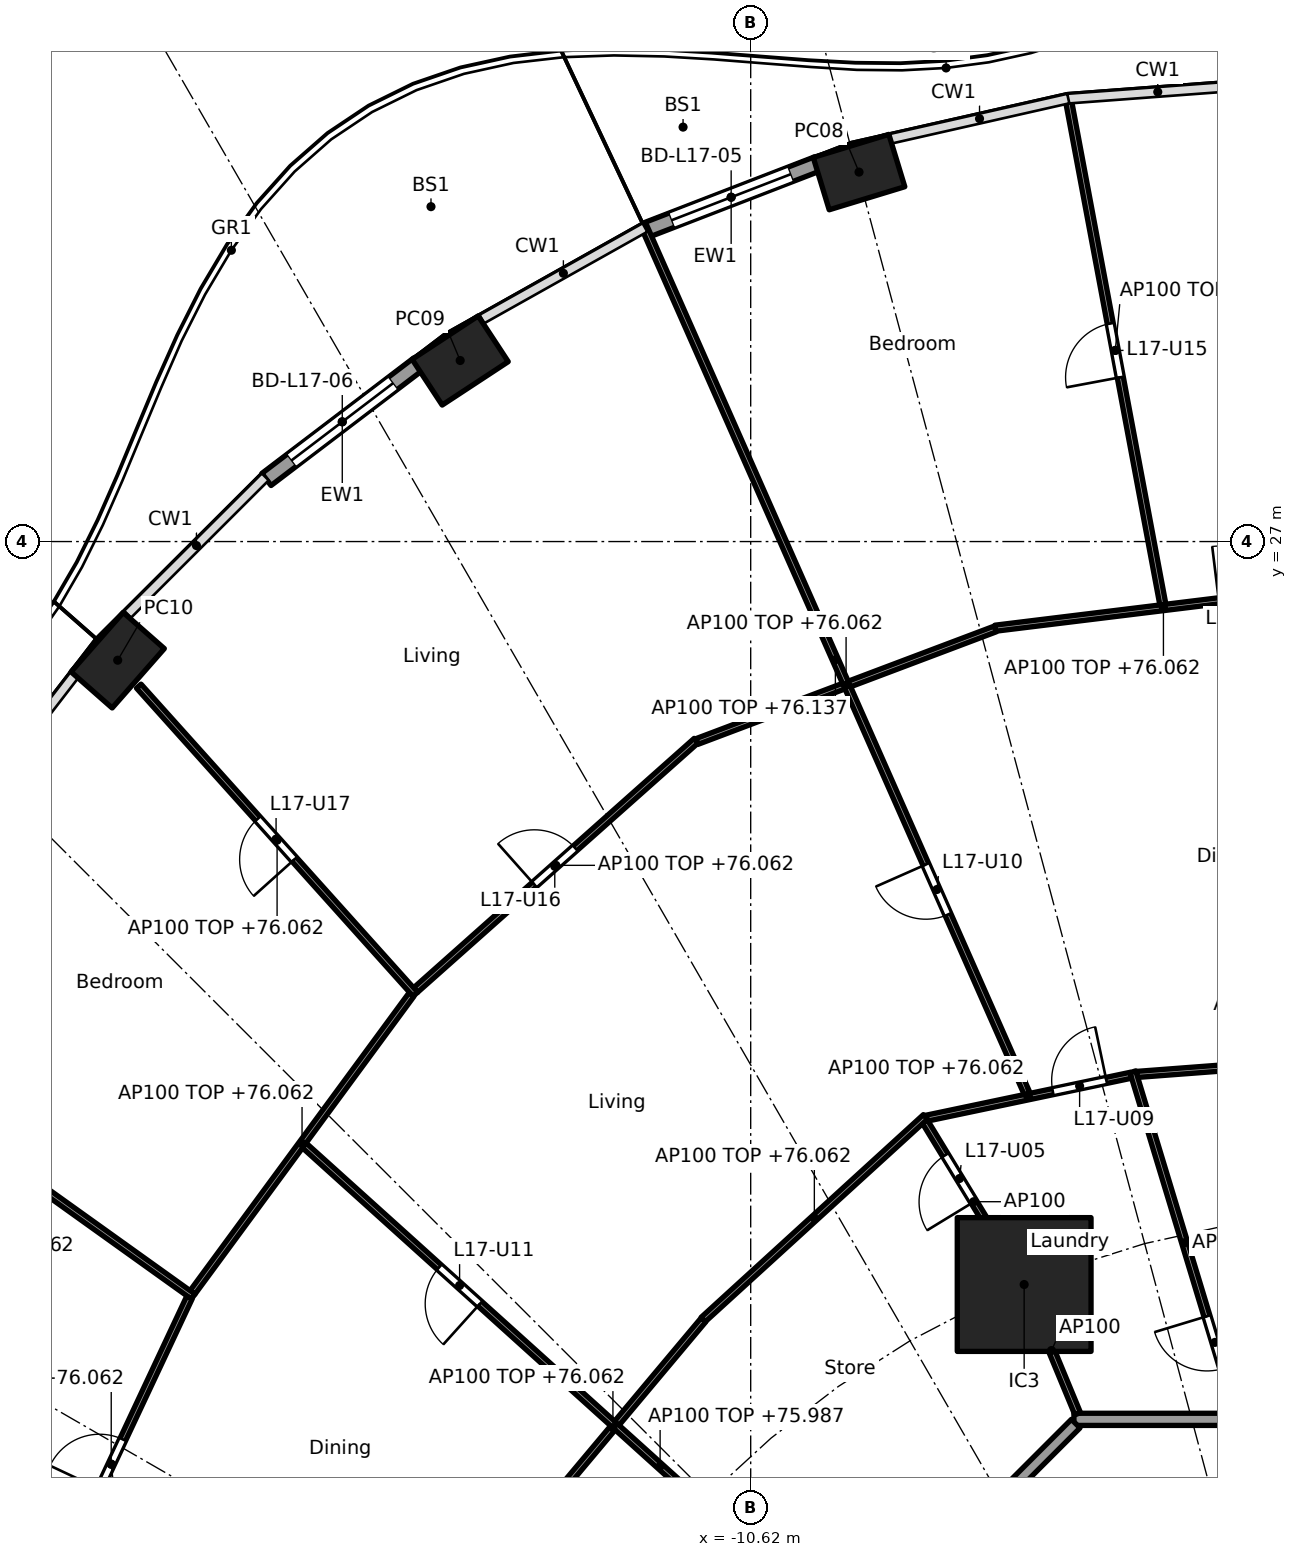
"""IFC4 building model, lengths in metres.
Left out: names, types, materials, properties, quantities, classifications, styles, units other than length and angle.
Written with IfcOpenShell. Run it as: python <this file> out.ifc"""

import sys

from ifc_helpers import new_model, si_unit, direction, frame, frame_2d, origin, origin_2d, place, context, subcontext, project, spatial, rectangle, hollow_rectangle, extrude, element, fill, save


model = new_model("IFC4")
c1 = context("Model", 3, precision=1e-05, world=origin(), true_north=direction((0.0, 1.0)))
c2 = subcontext(c1, "Body", "Model", "MODEL_VIEW")
j1 = project(units=[si_unit("LENGTHUNIT", "METRE"), si_unit("PLANEANGLEUNIT", "RADIAN")], contexts=[c1])
p1 = place(None, origin())
s1 = spatial("IfcSite", under=j1, at=p1, CompositionType="ELEMENT")
p2 = place(p1, origin())
s2 = spatial("IfcBuilding", under=s1, at=p2, CompositionType="ELEMENT")
p3 = place(p2, frame((0.0, 0.0, 73.3)))
s3 = spatial("IfcBuildingStorey", under=s2, at=p3, CompositionType="ELEMENT", Elevation=73.3)
for number, where, z_axis, x_axis in (
    (1, (-8.839, 33.076, -0.26), (0.0, 0.0, 1.0), (-0.957, -0.292, 0.0)),
    (2, (-15.397, 29.978, -0.26), (0.0, 0.0, 1.0), (-0.836, -0.549, 0.0)),
    (3, (-21.03, 25.049, -0.26), (0.0, 0.0, 1.0), (-0.66, -0.751, 0.0)),
):
    element("IfcColumn", number, at=place(p3, frame(where, z_axis=z_axis, x_axis=x_axis)), inside=s3, PredefinedType="COLUMN", context=c2, shape_type="SweptSolid", body=[
        extrude(hollow_rectangle(XDim=1.3, YDim=0.9, WallThickness=0.045, at=origin_2d()), origin(), (0.0, 0.0, 1.0), 3.96),
    ])
p4 = place(p3, frame((-6.123, 14.782, 0.0), z_axis=(0.0, 0.0, 1.0), x_axis=(1.0, 0.0, 0.0)))
e4 = element("IfcColumn", 4, at=p4, inside=s3, PredefinedType="COLUMN", context=c2, shape_type="SweptSolid", body=[
    extrude(rectangle(XDim=2.2, YDim=2.2, at=origin_2d()), origin(), (0.0, 0.0, 1.0), 3.7),
])
p5 = place(p3, frame((-12.353, 32.117, 0.0), z_axis=(0.0, 0.0, 1.0), x_axis=(0.932827091302, 0.360324322982, 0.0)))
e5 = element("IfcWall", 5, at=p5, inside=s3, PredefinedType="SOLIDWALL", context=c2, shape_type="SweptSolid", body=[
    extrude(rectangle(XDim=3.027, YDim=0.25, at=frame_2d((1.514, 0.0))), origin(), (0.0, 0.0, 1.0), 3.44),
])
p6 = place(p5, frame((0.464, 0.0, 0.0)))
e6 = element("IfcOpeningElement", 6, at=p6, cuts=e5, PredefinedType="OPENING", context=c2, shape_type="SweptSolid", body=[
    extrude(rectangle(XDim=2.1, YDim=2.4, at=frame_2d((1.05, 1.2))), frame((0.0, 0.135, 0.0), z_axis=(0.0, -1.0, 0.0), x_axis=(1.0, 0.0, 0.0)), (0.0, 0.0, 1.0), 0.27),
])
p7 = place(p3, frame((-18.584, 28.021, 0.0), z_axis=(0.0, 0.0, 1.0), x_axis=(0.796037575978, 0.605247203736, 0.0)))
e7 = element("IfcWall", 7, at=p7, inside=s3, PredefinedType="SOLIDWALL", context=c2, shape_type="SweptSolid", body=[
    extrude(rectangle(XDim=3.134, YDim=0.25, at=frame_2d((1.567, 0.0))), origin(), (0.0, 0.0, 1.0), 3.44),
])
p8 = place(p7, frame((0.517, 0.0, 0.0)))
e8 = element("IfcOpeningElement", 8, at=p8, cuts=e7, PredefinedType="OPENING", context=c2, shape_type="SweptSolid", body=[
    extrude(rectangle(XDim=2.1, YDim=2.4, at=frame_2d((1.05, 1.2))), frame((0.0, 0.135, 0.0), z_axis=(0.0, -1.0, 0.0), x_axis=(1.0, 0.0, 0.0)), (0.0, 0.0, 1.0), 0.27),
])
p9 = place(p3, frame((5.104, 12.565, 0.0), z_axis=(0.0, 0.0, 1.0), x_axis=(-1.0, 0.0, 0.0)))
e9 = element("IfcWall", 9, at=p9, inside=s3, PredefinedType="PARTITIONING", context=c2, shape_type="SweptSolid", body=[
    extrude(rectangle(XDim=10.409, YDim=0.2, at=frame_2d((5.205, 0.0))), origin(), (0.0, 0.0, 1.0), 3.44),
])
p10 = place(p9, frame((0.751, 0.0, 0.0)))
e10 = element("IfcOpeningElement", 10, at=p10, cuts=e9, PredefinedType="OPENING", context=c2, shape_type="SweptSolid", body=[
    extrude(rectangle(XDim=1.0, YDim=2.1, at=frame_2d((0.5, 1.05))), frame((0.0, 0.11, 0.0), z_axis=(0.0, -1.0, 0.0), x_axis=(1.0, 0.0, 0.0)), (0.0, 0.0, 1.0), 0.22),
])
p11 = place(p3, frame((-5.275, 12.494, 0.0), z_axis=(0.0, 0.0, 1.0), x_axis=(-0.707106781187, -0.707106781187, 0.0)))
e11 = element("IfcWall", 11, at=p11, inside=s3, PredefinedType="PARTITIONING", context=c2, shape_type="SweptSolid", body=[
    extrude(rectangle(XDim=10.209, YDim=0.2, at=frame_2d((5.104, 0.0))), origin(), (0.0, 0.0, 1.0), 3.44),
])
p12 = place(p3, frame((-0.536, 18.519, 0.0), z_axis=(0.0, 0.0, 1.0), x_axis=(-0.99715294352, -0.075405618017, 0.0)))
e12 = element("IfcWall", 12, at=p12, inside=s3, PredefinedType="PARTITIONING", context=c2, shape_type="SweptSolid", body=[
    extrude(rectangle(XDim=3.746, YDim=0.1, at=frame_2d((1.873, 0.0))), origin(), (0.0, 0.0, 1.0), 2.762),
])
p13 = place(p3, frame((-1.066, 26.253, 0.0), z_axis=(0.0, 0.0, 1.0), x_axis=(-0.992574197255, -0.121640712523, 0.0)))
e13 = element("IfcWall", 13, at=p13, inside=s3, PredefinedType="PARTITIONING", context=c2, shape_type="SweptSolid", body=[
    extrude(rectangle(XDim=5.574, YDim=0.1, at=frame_2d((2.787, 0.0))), origin(), (0.0, 0.0, 1.0), 2.762),
])
p14 = place(p13, frame((0.969, 0.0, 0.0)))
e14 = element("IfcOpeningElement", 14, at=p14, cuts=e13, PredefinedType="OPENING", context=c2, shape_type="SweptSolid", body=[
    extrude(rectangle(XDim=0.9, YDim=2.1, at=frame_2d((0.45, 1.05))), frame((0.0, 0.06, 0.0), z_axis=(0.0, -1.0, 0.0), x_axis=(1.0, 0.0, 0.0)), (0.0, 0.0, 1.0), 0.12),
])
p15 = place(p3, frame((-3.842, 25.963, 0.0), z_axis=(0.0, 0.0, 1.0), x_axis=(-0.184068442651, 0.982913428752, 0.0)))
e15 = element("IfcWall", 15, at=p15, inside=s3, PredefinedType="PARTITIONING", context=c2, shape_type="SweptSolid", body=[
    extrude(rectangle(XDim=8.506, YDim=0.1, at=frame_2d((4.253, 0.0))), origin(), (0.0, 0.0, 1.0), 2.837),
])
p16 = place(p15, frame((3.803, 0.0, 0.0)))
e16 = element("IfcOpeningElement", 16, at=p16, cuts=e15, PredefinedType="OPENING", context=c2, shape_type="SweptSolid", body=[
    extrude(rectangle(XDim=0.9, YDim=2.1, at=frame_2d((0.45, 1.05))), frame((0.0, 0.06, 0.0), z_axis=(0.0, -1.0, 0.0), x_axis=(1.0, 0.0, 0.0)), (0.0, 0.0, 1.0), 0.12),
])
p17 = place(p3, frame((-2.631, 12.66, 0.0), z_axis=(0.0, 0.0, 1.0), x_axis=(-0.290145836284, 0.956982441682, 0.0)))
e17 = element("IfcWall", 17, at=p17, inside=s3, PredefinedType="PARTITIONING", context=c2, shape_type="SweptSolid", body=[
    extrude(rectangle(XDim=5.873, YDim=0.1, at=frame_2d((2.937, 0.0))), origin(), (0.0, 0.0, 1.0), 2.687),
])
p18 = place(p17, frame((0.772, 0.0, 0.0)))
e18 = element("IfcOpeningElement", 18, at=p18, cuts=e17, PredefinedType="OPENING", context=c2, shape_type="SweptSolid", body=[
    extrude(rectangle(XDim=0.9, YDim=2.1, at=frame_2d((0.45, 1.05))), frame((0.0, 0.06, 0.0), z_axis=(0.0, -1.0, 0.0), x_axis=(1.0, 0.0, 0.0)), (0.0, 0.0, 1.0), 0.12),
])
p19 = place(p3, frame((-4.37, 18.223, 0.0), z_axis=(0.0, 0.0, 1.0), x_axis=(-0.978619056583, -0.205681166112, 0.0)))
e19 = element("IfcWall", 19, at=p19, inside=s3, PredefinedType="PARTITIONING", context=c2, shape_type="SweptSolid", body=[
    extrude(rectangle(XDim=3.438, YDim=0.1, at=frame_2d((1.719, 0.0))), origin(), (0.0, 0.0, 1.0), 2.762),
])
p20 = place(p19, frame((0.409, 0.0, 0.0)))
e20 = element("IfcOpeningElement", 20, at=p20, cuts=e19, PredefinedType="OPENING", context=c2, shape_type="SweptSolid", body=[
    extrude(rectangle(XDim=0.9, YDim=2.1, at=frame_2d((0.45, 1.05))), frame((0.0, 0.06, 0.0), z_axis=(0.0, -1.0, 0.0), x_axis=(1.0, 0.0, 0.0)), (0.0, 0.0, 1.0), 0.12),
])
p21 = place(p3, frame((-6.596, 25.563, 0.0), z_axis=(0.0, 0.0, 1.0), x_axis=(-0.9356162121, -0.353018843201, 0.0)))
e21 = element("IfcWall", 21, at=p21, inside=s3, PredefinedType="PARTITIONING", context=c2, shape_type="SweptSolid", body=[
    extrude(rectangle(XDim=5.249, YDim=0.1, at=frame_2d((2.625, 0.0))), origin(), (0.0, 0.0, 1.0), 2.762),
])
p22 = place(p3, frame((-6.072, 17.915, 0.0), z_axis=(0.0, 0.0, 1.0), x_axis=(-0.404139814253, 0.914697223422, 0.0)))
e22 = element("IfcWall", 22, at=p22, inside=s3, PredefinedType="PARTITIONING", context=c2, shape_type="SweptSolid", body=[
    extrude(rectangle(XDim=15.614, YDim=0.1, at=frame_2d((7.807, 0.0))), origin(), (0.0, 0.0, 1.0), 2.837),
])
p23 = place(p22, frame((3.226, 0.0, 0.0)))
e23 = element("IfcOpeningElement", 23, at=p23, cuts=e22, PredefinedType="OPENING", context=c2, shape_type="SweptSolid", body=[
    extrude(rectangle(XDim=0.9, YDim=2.1, at=frame_2d((0.45, 1.05))), frame((0.0, 0.06, 0.0), z_axis=(0.0, -1.0, 0.0), x_axis=(1.0, 0.0, 0.0)), (0.0, 0.0, 1.0), 0.12),
])
p24 = place(p3, frame((-5.243, 12.657, 0.0), z_axis=(0.0, 0.0, 1.0), x_axis=(-0.382703272338, 0.923871314276, 0.0)))
e24 = element("IfcWall", 24, at=p24, inside=s3, PredefinedType="PARTITIONING", context=c2, shape_type="SweptSolid", body=[
    extrude(rectangle(XDim=2.249, YDim=0.1, at=frame_2d((1.125, 0.0))), origin(), (0.0, 0.0, 1.0), 3.44),
])
p25 = place(p3, frame((-6.149, 14.825, 0.0), z_axis=(0.0, 0.0, 1.0), x_axis=(-0.520433196839, 0.853902387646, 0.0)))
e25 = element("IfcWall", 25, at=p25, inside=s3, PredefinedType="PARTITIONING", context=c2, shape_type="SweptSolid", body=[
    extrude(rectangle(XDim=3.09, YDim=0.1, at=frame_2d((1.545, 0.0))), origin(), (0.0, 0.0, 1.0), 3.44),
])
p26 = place(p25, frame((1.542, 0.0, 0.0)))
e26 = element("IfcOpeningElement", 26, at=p26, cuts=e25, PredefinedType="OPENING", context=c2, shape_type="SweptSolid", body=[
    extrude(rectangle(XDim=0.9, YDim=2.1, at=frame_2d((0.45, 1.05))), frame((0.0, 0.06, 0.0), z_axis=(0.0, -1.0, 0.0), x_axis=(1.0, 0.0, 0.0)), (0.0, 0.0, 1.0), 0.12),
])
p27 = place(p3, frame((-7.746, 17.539, 0.0), z_axis=(0.0, 0.0, 1.0), x_axis=(-0.738860434967, -0.673858484877, 0.0)))
e27 = element("IfcWall", 27, at=p27, inside=s3, PredefinedType="PARTITIONING", context=c2, shape_type="SweptSolid", body=[
    extrude(rectangle(XDim=4.947, YDim=0.1, at=frame_2d((2.473, 0.0))), origin(), (0.0, 0.0, 1.0), 2.762),
])
p28 = place(p3, frame((-11.516, 23.726, 0.0), z_axis=(0.0, 0.0, 1.0), x_axis=(-0.747428955243, -0.664341747043, 0.0)))
e28 = element("IfcWall", 28, at=p28, inside=s3, PredefinedType="PARTITIONING", context=c2, shape_type="SweptSolid", body=[
    extrude(rectangle(XDim=6.174, YDim=0.1, at=frame_2d((3.087, 0.0))), origin(), (0.0, 0.0, 1.0), 2.762),
])
p29 = place(p28, frame((2.662, 0.0, 0.0)))
e29 = element("IfcOpeningElement", 29, at=p29, cuts=e28, PredefinedType="OPENING", context=c2, shape_type="SweptSolid", body=[
    extrude(rectangle(XDim=0.9, YDim=2.1, at=frame_2d((0.45, 1.05))), frame((0.0, 0.06, 0.0), z_axis=(0.0, -1.0, 0.0), x_axis=(1.0, 0.0, 0.0)), (0.0, 0.0, 1.0), 0.12),
])
p30 = place(p3, frame((-11.396, 14.202, 0.0), z_axis=(0.0, 0.0, 1.0), x_axis=(-0.642475660273, -0.766306091557, 0.0)))
e30 = element("IfcWall", 30, at=p30, inside=s3, PredefinedType="PARTITIONING", context=c2, shape_type="SweptSolid", body=[
    extrude(rectangle(XDim=4.637, YDim=0.1, at=frame_2d((2.319, 0.0))), origin(), (0.0, 0.0, 1.0), 2.762),
])
p31 = place(p3, frame((-16.134, 19.554, 0.0), z_axis=(0.0, 0.0, 1.0), x_axis=(-0.667985610263, 0.74417418961, 0.0)))
e31 = element("IfcWall", 31, at=p31, inside=s3, PredefinedType="PARTITIONING", context=c2, shape_type="SweptSolid", body=[
    extrude(rectangle(XDim=6.809, YDim=0.1, at=frame_2d((3.405, 0.0))), origin(), (0.0, 0.0, 1.0), 2.762),
])
p32 = place(p31, frame((2.98, 0.0, 0.0)))
e32 = element("IfcOpeningElement", 32, at=p32, cuts=e31, PredefinedType="OPENING", context=c2, shape_type="SweptSolid", body=[
    extrude(rectangle(XDim=0.9, YDim=2.1, at=frame_2d((0.45, 1.05))), frame((0.0, 0.06, 0.0), z_axis=(0.0, -1.0, 0.0), x_axis=(1.0, 0.0, 0.0)), (0.0, 0.0, 1.0), 0.12),
])
p33 = place(p3, frame((-16.197, 19.551, 0.0), z_axis=(0.0, 0.0, 1.0), x_axis=(-0.592391983588, -0.80564988536, 0.0)))
e33 = element("IfcWall", 33, at=p33, inside=s3, PredefinedType="PARTITIONING", context=c2, shape_type="SweptSolid", body=[
    extrude(rectangle(XDim=6.08, YDim=0.1, at=frame_2d((3.04, 0.0))), origin(), (0.0, 0.0, 1.0), 2.762),
])
p34 = place(p3, frame((-8.959, 8.952, 0.0), z_axis=(0.0, 0.0, 1.0), x_axis=(-0.742679904999, 0.669646592398, 0.0)))
e34 = element("IfcWall", 34, at=p34, inside=s3, PredefinedType="PARTITIONING", context=c2, shape_type="SweptSolid", body=[
    extrude(rectangle(XDim=12.121, YDim=0.1, at=frame_2d((6.061, 0.0))), origin(), (0.0, 0.0, 1.0), 2.687),
])
p35 = place(p34, frame((2.172, 0.0, 0.0)))
e35 = element("IfcOpeningElement", 35, at=p35, cuts=e34, PredefinedType="OPENING", context=c2, shape_type="SweptSolid", body=[
    extrude(rectangle(XDim=0.9, YDim=2.1, at=frame_2d((0.45, 1.05))), frame((0.0, 0.06, 0.0), z_axis=(0.0, -1.0, 0.0), x_axis=(1.0, 0.0, 0.0)), (0.0, 0.0, 1.0), 0.12),
])
p36 = place(p34, frame((8.233, 0.0, 0.0)))
e36 = element("IfcOpeningElement", 36, at=p36, cuts=e34, PredefinedType="OPENING", context=c2, shape_type="SweptSolid", body=[
    extrude(rectangle(XDim=0.9, YDim=2.1, at=frame_2d((0.45, 1.05))), frame((0.0, 0.06, 0.0), z_axis=(0.0, -1.0, 0.0), x_axis=(1.0, 0.0, 0.0)), (0.0, 0.0, 1.0), 0.12),
])
p37 = place(p3, frame((-19.788, 14.583, 0.0), z_axis=(0.0, 0.0, 1.0), x_axis=(-0.813175286569, 0.58201885993, 0.0)))
e37 = element("IfcWall", 37, at=p37, inside=s3, PredefinedType="PARTITIONING", context=c2, shape_type="SweptSolid", body=[
    extrude(rectangle(XDim=6.329, YDim=0.1, at=frame_2d((3.164, 0.0))), origin(), (0.0, 0.0, 1.0), 2.762),
])
p38 = place(p3, frame((-19.85, 14.567, 0.0), z_axis=(0.0, 0.0, 1.0), x_axis=(-0.424942210745, -0.905220480064, 0.0)))
e38 = element("IfcWall", 38, at=p38, inside=s3, PredefinedType="PARTITIONING", context=c2, shape_type="SweptSolid", body=[
    extrude(rectangle(XDim=6.053, YDim=0.1, at=frame_2d((3.027, 0.0))), origin(), (0.0, 0.0, 1.0), 2.762),
])
p39 = place(p38, frame((2.577, 0.0, 0.0)))
e39 = element("IfcOpeningElement", 39, at=p39, cuts=e38, PredefinedType="OPENING", context=c2, shape_type="SweptSolid", body=[
    extrude(rectangle(XDim=0.9, YDim=2.1, at=frame_2d((0.45, 1.05))), frame((0.0, 0.06, 0.0), z_axis=(0.0, -1.0, 0.0), x_axis=(1.0, 0.0, 0.0)), (0.0, 0.0, 1.0), 0.12),
])
p40 = place(p6, origin())
e40 = element("IfcDoor", 40, at=p40, inside=s3, OperationType="SLIDING_TO_LEFT", PredefinedType="DOOR", context=c2, shape_type="SweptSolid", body=[
    extrude(rectangle(XDim=2.1, YDim=2.4, at=frame_2d((1.05, 1.2))), frame((0.0, 0.025, 0.0), z_axis=(0.0, -1.0, 0.0), x_axis=(1.0, 0.0, 0.0)), (0.0, 0.0, 1.0), 0.05),
])
fill(e6, e40)
p41 = place(p8, origin())
e41 = element("IfcDoor", 41, at=p41, inside=s3, OperationType="SLIDING_TO_LEFT", PredefinedType="DOOR", context=c2, shape_type="SweptSolid", body=[
    extrude(rectangle(XDim=2.1, YDim=2.4, at=frame_2d((1.05, 1.2))), frame((0.0, 0.025, 0.0), z_axis=(0.0, -1.0, 0.0), x_axis=(1.0, 0.0, 0.0)), (0.0, 0.0, 1.0), 0.05),
])
fill(e8, e41)
p42 = place(p18, origin())
e42 = element("IfcDoor", 42, at=p42, inside=s3, OperationType="SINGLE_SWING_RIGHT", PredefinedType="DOOR", context=c2, shape_type="SweptSolid", body=[
    extrude(rectangle(XDim=0.9, YDim=2.1, at=frame_2d((0.45, 1.05))), frame((0.0, 0.025, 0.0), z_axis=(0.0, -1.0, 0.0), x_axis=(1.0, 0.0, 0.0)), (0.0, 0.0, 1.0), 0.05),
])
fill(e18, e42)
p43 = place(p26, origin())
e43 = element("IfcDoor", 43, at=p43, inside=s3, OperationType="SINGLE_SWING_LEFT", PredefinedType="DOOR", context=c2, shape_type="SweptSolid", body=[
    extrude(rectangle(XDim=0.9, YDim=2.1, at=frame_2d((0.45, 1.05))), frame((0.0, 0.025, 0.0), z_axis=(0.0, -1.0, 0.0), x_axis=(1.0, 0.0, 0.0)), (0.0, 0.0, 1.0), 0.05),
])
fill(e26, e43)
p44 = place(p20, frame((0.9, 0.0, 0.0), x_axis=(-1.0, 0.0, 0.0)))
e44 = element("IfcDoor", 44, at=p44, inside=s3, OperationType="SINGLE_SWING_RIGHT", PredefinedType="DOOR", context=c2, shape_type="SweptSolid", body=[
    extrude(rectangle(XDim=0.9, YDim=2.1, at=frame_2d((0.45, 1.05))), frame((0.0, 0.025, 0.0), z_axis=(0.0, -1.0, 0.0), x_axis=(1.0, 0.0, 0.0)), (0.0, 0.0, 1.0), 0.05),
])
fill(e20, e44)
p45 = place(p23, origin())
e45 = element("IfcDoor", 45, at=p45, inside=s3, OperationType="SINGLE_SWING_RIGHT", PredefinedType="DOOR", context=c2, shape_type="SweptSolid", body=[
    extrude(rectangle(XDim=0.9, YDim=2.1, at=frame_2d((0.45, 1.05))), frame((0.0, 0.025, 0.0), z_axis=(0.0, -1.0, 0.0), x_axis=(1.0, 0.0, 0.0)), (0.0, 0.0, 1.0), 0.05),
])
fill(e23, e45)
p46 = place(p36, origin())
e46 = element("IfcDoor", 46, at=p46, inside=s3, OperationType="SINGLE_SWING_LEFT", PredefinedType="DOOR", context=c2, shape_type="SweptSolid", body=[
    extrude(rectangle(XDim=0.9, YDim=2.1, at=frame_2d((0.45, 1.05))), frame((0.0, 0.025, 0.0), z_axis=(0.0, -1.0, 0.0), x_axis=(1.0, 0.0, 0.0)), (0.0, 0.0, 1.0), 0.05),
])
fill(e36, e46)
p47 = place(p16, origin())
e47 = element("IfcDoor", 47, at=p47, inside=s3, OperationType="SINGLE_SWING_LEFT", PredefinedType="DOOR", context=c2, shape_type="SweptSolid", body=[
    extrude(rectangle(XDim=0.9, YDim=2.1, at=frame_2d((0.45, 1.05))), frame((0.0, 0.025, 0.0), z_axis=(0.0, -1.0, 0.0), x_axis=(1.0, 0.0, 0.0)), (0.0, 0.0, 1.0), 0.05),
])
fill(e16, e47)
p48 = place(p29, frame((0.9, 0.0, 0.0), x_axis=(-1.0, 0.0, 0.0)))
e48 = element("IfcDoor", 48, at=p48, inside=s3, OperationType="SINGLE_SWING_LEFT", PredefinedType="DOOR", context=c2, shape_type="SweptSolid", body=[
    extrude(rectangle(XDim=0.9, YDim=2.1, at=frame_2d((0.45, 1.05))), frame((0.0, 0.025, 0.0), z_axis=(0.0, -1.0, 0.0), x_axis=(1.0, 0.0, 0.0)), (0.0, 0.0, 1.0), 0.05),
])
fill(e29, e48)
p49 = place(p32, origin())
e49 = element("IfcDoor", 49, at=p49, inside=s3, OperationType="SINGLE_SWING_LEFT", PredefinedType="DOOR", context=c2, shape_type="SweptSolid", body=[
    extrude(rectangle(XDim=0.9, YDim=2.1, at=frame_2d((0.45, 1.05))), frame((0.0, 0.025, 0.0), z_axis=(0.0, -1.0, 0.0), x_axis=(1.0, 0.0, 0.0)), (0.0, 0.0, 1.0), 0.05),
])
fill(e32, e49)
p50 = place(p39, frame((0.9, 0.0, 0.0), x_axis=(-1.0, 0.0, 0.0)))
e50 = element("IfcDoor", 50, at=p50, inside=s3, OperationType="SINGLE_SWING_LEFT", PredefinedType="DOOR", context=c2, shape_type="SweptSolid", body=[
    extrude(rectangle(XDim=0.9, YDim=2.1, at=frame_2d((0.45, 1.05))), frame((0.0, 0.025, 0.0), z_axis=(0.0, -1.0, 0.0), x_axis=(1.0, 0.0, 0.0)), (0.0, 0.0, 1.0), 0.05),
])
fill(e39, e50)
save(model, sys.argv[1])
